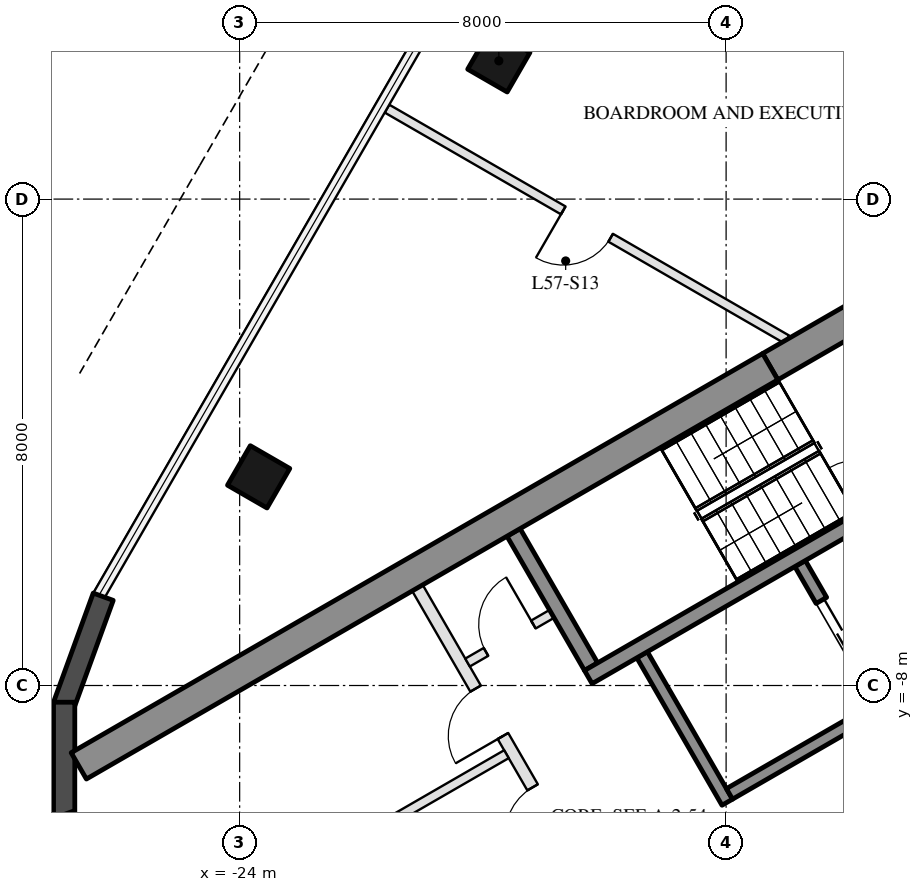
"""IFC4 building model, lengths in metres.
Left out: names, types, materials, properties, quantities, classifications, styles, units other than length and angle.
Written with IfcOpenShell. Run it as: python <this file> out.ifc"""

import sys

from ifc_helpers import new_model, si_unit, direction, frame, frame_2d, origin, origin_2d, place, context, subcontext, project, spatial, rectangle, hollow_rectangle, extrude, element, fill, save


model = new_model("IFC4")
c1 = context("Model", 3, precision=1e-05, world=origin(), true_north=direction((0.0, 1.0)))
c2 = subcontext(c1, "Body", "Model", "MODEL_VIEW")
j1 = project(units=[si_unit("LENGTHUNIT", "METRE"), si_unit("PLANEANGLEUNIT", "RADIAN")], contexts=[c1])
p1 = place(None, origin())
s1 = spatial("IfcSite", under=j1, at=p1, CompositionType="ELEMENT")
p2 = place(p1, origin())
s2 = spatial("IfcBuilding", under=s1, at=p2, CompositionType="ELEMENT")
p3 = place(p2, frame((0.0, 0.0, 231.7)))
s3 = spatial("IfcBuildingStorey", under=s2, at=p3, CompositionType="ELEMENT", Elevation=231.7)
for number, where, z_axis, x_axis in (
    (1, (-19.738, 2.273, 0.0), (0.0, 0.0, 1.0), (0.5, 0.866, 0.0)),
    (2, (-23.688, -4.568, 0.0), (0.0, 0.0, 1.0), (0.5, 0.866, 0.0)),
):
    element("IfcColumn", number, at=place(p3, frame(where, z_axis=z_axis, x_axis=x_axis)), inside=s3, PredefinedType="COLUMN", context=c2, shape_type="SweptSolid", body=[
        extrude(hollow_rectangle(XDim=0.75, YDim=0.75, WallThickness=0.035, at=origin_2d()), origin(), (0.0, 0.0, 1.0), 6.0),
    ])
for number, where, z_axis, x_axis in (
    (3, (-26.244, -6.54, 0.0), (0.0, 0.0, 1.0), (-0.342, -0.94, 0.0)),
    (4, (-26.886, -8.275, 0.0), (0.0, 0.0, 1.0), (0.0, -1.0, 0.0)),
    (5, (-26.897, -10.125, 0.0), (0.0, 0.0, 1.0), (0.342, -0.94, 0.0)),
):
    element("IfcWall", number, at=place(p3, frame(where, z_axis=z_axis, x_axis=x_axis)), inside=s3, PredefinedType="SOLIDWALL", context=c2, shape_type="SweptSolid", body=[
        extrude(rectangle(XDim=1.91, YDim=0.35, at=frame_2d((0.955, 0.0))), origin(), (0.0, 0.0, 1.0), 5.7),
    ])
p4 = place(p3, frame((-19.496, -5.482, 0.0), z_axis=(0.0, 0.0, 1.0), x_axis=(0.499990435942, -0.866030925526, 0.0)))
e6 = element("IfcWall", 6, at=p4, inside=s3, PredefinedType="SHEAR", context=c2, shape_type="SweptSolid", body=[
    extrude(rectangle(XDim=2.55, YDim=0.25, at=frame_2d((1.275, 0.0))), origin(), (0.0, 0.0, 1.0), 5.7),
])
p5 = place(p3, frame((-17.381, -7.495, 0.0), z_axis=(0.0, 0.0, 1.0), x_axis=(0.500011755427, -0.866018616679, 0.0)))
e7 = element("IfcWall", 7, at=p5, inside=s3, PredefinedType="SHEAR", context=c2, shape_type="SweptSolid", body=[
    extrude(rectangle(XDim=2.8, YDim=0.2, at=frame_2d((1.4, 0.0))), origin(), (0.0, 0.0, 1.0), 5.7),
])
p6 = place(p3, frame((-14.783, -5.995, 0.0), z_axis=(0.0, 0.0, 1.0), x_axis=(0.49994636267, -0.866056369097, 0.0)))
e8 = element("IfcWall", 8, at=p6, inside=s3, PredefinedType="SHEAR", context=c2, shape_type="SweptSolid", body=[
    extrude(rectangle(XDim=2.8, YDim=0.2, at=frame_2d((1.4, 0.0))), origin(), (0.0, 0.0, 1.0), 5.7),
])
p7 = place(p6, frame((0.7, 0.0, 0.0)))
e9 = element("IfcOpeningElement", 9, at=p7, cuts=e8, PredefinedType="OPENING", context=c2, shape_type="SweptSolid", body=[
    extrude(rectangle(XDim=1.2, YDim=2.1, at=frame_2d((0.6, 1.05))), frame((0.0, 0.11, 0.0), z_axis=(0.0, -1.0, 0.0), x_axis=(1.0, 0.0, 0.0)), (0.0, 0.0, 1.0), 0.22),
])
p8 = place(p3, frame((-13.52, -8.383, 0.0), z_axis=(0.0, 0.0, 1.0), x_axis=(-0.866034573852, -0.49998411664, 0.0)))
e10 = element("IfcWall", 10, at=p8, inside=s3, PredefinedType="SHEAR", context=c2, shape_type="SweptSolid", body=[
    extrude(rectangle(XDim=2.8, YDim=0.2, at=frame_2d((1.4, 0.0))), origin(), (0.0, 0.0, 1.0), 5.7),
])
p9 = place(p3, frame((-10.068, -9.162, 0.0), z_axis=(0.0, 0.0, 1.0), x_axis=(-0.866032725843, -0.499987317609, 0.0)))
e11 = element("IfcWall", 11, at=p9, inside=s3, PredefinedType="SHEAR", context=c2, shape_type="SweptSolid", body=[
    extrude(rectangle(XDim=10.16, YDim=0.2, at=frame_2d((5.08, 0.0))), origin(), (0.0, 0.0, 1.0), 5.7),
])
p10 = place(p9, frame((0.62, 0.0, 0.0)))
e12 = element("IfcOpeningElement", 12, at=p10, cuts=e11, PredefinedType="OPENING", context=c2, shape_type="SweptSolid", body=[
    extrude(rectangle(XDim=1.1, YDim=2.1, at=frame_2d((0.55, 1.05))), frame((0.0, 0.11, 0.0), z_axis=(0.0, -1.0, 0.0), x_axis=(1.0, 0.0, 0.0)), (0.0, 0.0, 1.0), 0.22),
])
p11 = place(p9, frame((3.16, 0.0, 0.0)))
e13 = element("IfcOpeningElement", 13, at=p11, cuts=e11, PredefinedType="OPENING", context=c2, shape_type="SweptSolid", body=[
    extrude(rectangle(XDim=1.1, YDim=2.1, at=frame_2d((0.55, 1.05))), frame((0.0, 0.11, 0.0), z_axis=(0.0, -1.0, 0.0), x_axis=(1.0, 0.0, 0.0)), (0.0, 0.0, 1.0), 0.22),
])
p12 = place(p9, frame((5.7, 0.0, 0.0)))
e14 = element("IfcOpeningElement", 14, at=p12, cuts=e11, PredefinedType="OPENING", context=c2, shape_type="SweptSolid", body=[
    extrude(rectangle(XDim=1.1, YDim=2.1, at=frame_2d((0.55, 1.05))), frame((0.0, 0.11, 0.0), z_axis=(0.0, -1.0, 0.0), x_axis=(1.0, 0.0, 0.0)), (0.0, 0.0, 1.0), 0.22),
])
p13 = place(p9, frame((8.24, 0.0, 0.0)))
e15 = element("IfcOpeningElement", 15, at=p13, cuts=e11, PredefinedType="OPENING", context=c2, shape_type="SweptSolid", body=[
    extrude(rectangle(XDim=1.1, YDim=2.1, at=frame_2d((0.55, 1.05))), frame((0.0, 0.11, 0.0), z_axis=(0.0, -1.0, 0.0), x_axis=(1.0, 0.0, 0.0)), (0.0, 0.0, 1.0), 0.22),
])
p14 = place(p3, frame((-21.076, -6.395, 0.0), z_axis=(0.0, 0.0, 1.0), x_axis=(0.50001468107, -0.866016927499, 0.0)))
e16 = element("IfcWall", 16, at=p14, inside=s3, PredefinedType="PARTITIONING", context=c2, shape_type="SweptSolid", body=[
    extrude(rectangle(XDim=5.4, YDim=0.2, at=frame_2d((2.7, 0.0))), origin(), (0.0, 0.0, 1.0), 5.7),
])
p15 = place(p14, frame((1.913, 0.0, 0.0)))
e17 = element("IfcOpeningElement", 17, at=p15, cuts=e16, PredefinedType="OPENING", context=c2, shape_type="SweptSolid", body=[
    extrude(rectangle(XDim=0.9, YDim=2.1, at=frame_2d((0.45, 1.05))), frame((0.0, 0.11, 0.0), z_axis=(0.0, -1.0, 0.0), x_axis=(1.0, 0.0, 0.0)), (0.0, 0.0, 1.0), 0.22),
])
p16 = place(p14, frame((3.788, 0.0, 0.0)))
e18 = element("IfcOpeningElement", 18, at=p16, cuts=e16, PredefinedType="OPENING", context=c2, shape_type="SweptSolid", body=[
    extrude(rectangle(XDim=0.9, YDim=2.1, at=frame_2d((0.45, 1.05))), frame((0.0, 0.11, 0.0), z_axis=(0.0, -1.0, 0.0), x_axis=(1.0, 0.0, 0.0)), (0.0, 0.0, 1.0), 0.22),
])
p17 = place(p3, frame((-18.866, -6.822, 0.0), z_axis=(0.0, 0.0, 1.0), x_axis=(-0.866028054938, -0.499995408039, 0.0)))
e19 = element("IfcWall", 19, at=p17, inside=s3, PredefinedType="PARTITIONING", context=c2, shape_type="SweptSolid", body=[
    extrude(rectangle(XDim=1.6, YDim=0.15, at=frame_2d((0.8, 0.0))), origin(), (0.0, 0.0, 1.0), 5.7),
])
p18 = place(p17, frame((0.35, 0.0, 0.0)))
e20 = element("IfcOpeningElement", 20, at=p18, cuts=e19, PredefinedType="OPENING", context=c2, shape_type="SweptSolid", body=[
    extrude(rectangle(XDim=0.9, YDim=2.1, at=frame_2d((0.45, 1.05))), frame((0.0, 0.085, 0.0), z_axis=(0.0, -1.0, 0.0), x_axis=(1.0, 0.0, 0.0)), (0.0, 0.0, 1.0), 0.17),
])
p19 = place(p3, frame((-19.613, -9.13, 0.0), z_axis=(0.0, 0.0, 1.0), x_axis=(-0.866031734426, -0.499989034847, 0.0)))
e21 = element("IfcWall", 21, at=p19, inside=s3, PredefinedType="PARTITIONING", context=c2, shape_type="SweptSolid", body=[
    extrude(rectangle(XDim=6.95, YDim=0.15, at=frame_2d((3.475, 0.0))), origin(), (0.0, 0.0, 1.0), 5.7),
])
p20 = place(p3, frame((-13.797, -1.903, 0.0), z_axis=(0.0, 0.0, 1.0), x_axis=(-0.866033076574, -0.499986710104, 0.0)))
e22 = element("IfcWall", 22, at=p20, inside=s3, PredefinedType="SHEAR", context=c2, shape_type="SweptSolid", body=[
    extrude(rectangle(XDim=1.706, YDim=0.5, at=frame_2d((0.853, 0.0))), origin(), (0.0, 0.0, 1.0), 5.7),
])
p21 = place(p3, frame((-15.274, -2.756, 0.0), z_axis=(0.0, 0.0, 1.0), x_axis=(-0.86602396135, -0.500002498361, 0.0)))
e23 = element("IfcWall", 23, at=p21, inside=s3, PredefinedType="SHEAR", context=c2, shape_type="SweptSolid", body=[
    extrude(rectangle(XDim=13.131, YDim=0.5, at=frame_2d((6.565, 0.0))), origin(), (0.0, 0.0, 1.0), 5.7),
])
p22 = place(p3, frame((-13.812, -5.29, 0.0), z_axis=(0.0, 0.0, 1.0), x_axis=(-0.866023561601, -0.500003190742, 0.0)))
e24 = element("IfcWall", 24, at=p22, inside=s3, PredefinedType="SHEAR", context=c2, shape_type="SweptSolid", body=[
    extrude(rectangle(XDim=5.144, YDim=0.25, at=frame_2d((2.572, 0.0))), origin(), (0.0, 0.0, 1.0), 5.7),
])
p23 = place(p3, frame((-18.577, 6.684, 0.0), z_axis=(0.0, 0.0, 1.0), x_axis=(0.866026447599, -0.499998192055, 0.0)))
e25 = element("IfcWall", 25, at=p23, inside=s3, PredefinedType="PARTITIONING", context=c2, shape_type="SweptSolid", body=[
    extrude(rectangle(XDim=10.73, YDim=0.15, at=frame_2d((5.365, 0.0))), origin(), (0.0, 0.0, 1.0), 5.7),
])
p24 = place(p3, frame((-21.577, 1.488, 0.0), z_axis=(0.0, 0.0, 1.0), x_axis=(0.866014808974, -0.500018350302, 0.0)))
e26 = element("IfcWall", 26, at=p24, inside=s3, PredefinedType="PARTITIONING", context=c2, shape_type="SweptSolid", body=[
    extrude(rectangle(XDim=7.594, YDim=0.15, at=frame_2d((3.797, 0.0))), origin(), (0.0, 0.0, 1.0), 5.7),
])
p25 = place(p24, frame((3.347, 0.0, 0.0)))
e27 = element("IfcOpeningElement", 27, at=p25, cuts=e26, PredefinedType="OPENING", context=c2, shape_type="SweptSolid", body=[
    extrude(rectangle(XDim=0.9, YDim=2.1, at=frame_2d((0.45, 1.05))), frame((0.0, 0.085, 0.0), z_axis=(0.0, -1.0, 0.0), x_axis=(1.0, 0.0, 0.0)), (0.0, 0.0, 1.0), 0.17),
])
p26 = place(p7, origin())
e28 = element("IfcDoor", 28, at=p26, inside=s3, OperationType="DOUBLE_DOOR_SLIDING", PredefinedType="DOOR", context=c2, shape_type="SweptSolid", body=[
    extrude(rectangle(XDim=1.2, YDim=2.1, at=frame_2d((0.6, 1.05))), frame((0.0, 0.025, 0.0), z_axis=(0.0, -1.0, 0.0), x_axis=(1.0, 0.0, 0.0)), (0.0, 0.0, 1.0), 0.05),
])
fill(e9, e28)
p27 = place(p18, frame((0.9, 0.0, 0.0), z_axis=(0.0, 0.0, 1.0), x_axis=(-1.0, 0.0, 0.0)))
e29 = element("IfcDoor", 29, at=p27, inside=s3, OperationType="SINGLE_SWING_RIGHT", PredefinedType="DOOR", context=c2, shape_type="SweptSolid", body=[
    extrude(rectangle(XDim=0.9, YDim=2.1, at=frame_2d((0.45, 1.05))), frame((0.0, 0.025, 0.0), z_axis=(0.0, -1.0, 0.0), x_axis=(1.0, 0.0, 0.0)), (0.0, 0.0, 1.0), 0.05),
])
fill(e20, e29)
p28 = place(p15, frame((0.9, 0.0, 0.0), z_axis=(0.0, 0.0, 1.0), x_axis=(-1.0, 0.0, 0.0)))
e30 = element("IfcDoor", 30, at=p28, inside=s3, OperationType="SINGLE_SWING_LEFT", PredefinedType="DOOR", context=c2, shape_type="SweptSolid", body=[
    extrude(rectangle(XDim=0.9, YDim=2.1, at=frame_2d((0.45, 1.05))), frame((0.0, 0.025, 0.0), z_axis=(0.0, -1.0, 0.0), x_axis=(1.0, 0.0, 0.0)), (0.0, 0.0, 1.0), 0.05),
])
fill(e17, e30)
p29 = place(p16, frame((0.9, 0.0, 0.0), z_axis=(0.0, 0.0, 1.0), x_axis=(-1.0, 0.0, 0.0)))
e31 = element("IfcDoor", 31, at=p29, inside=s3, OperationType="SINGLE_SWING_LEFT", PredefinedType="DOOR", context=c2, shape_type="SweptSolid", body=[
    extrude(rectangle(XDim=0.9, YDim=2.1, at=frame_2d((0.45, 1.05))), frame((0.0, 0.025, 0.0), z_axis=(0.0, -1.0, 0.0), x_axis=(1.0, 0.0, 0.0)), (0.0, 0.0, 1.0), 0.05),
])
fill(e18, e31)
p30 = place(p25, frame((0.9, 0.0, 0.0), z_axis=(0.0, 0.0, 1.0), x_axis=(-1.0, 0.0, 0.0)))
e32 = element("IfcDoor", 32, at=p30, inside=s3, OperationType="SINGLE_SWING_RIGHT", PredefinedType="DOOR", context=c2, shape_type="SweptSolid", body=[
    extrude(rectangle(XDim=0.9, YDim=2.1, at=frame_2d((0.45, 1.05))), frame((0.0, 0.025, 0.0), z_axis=(0.0, -1.0, 0.0), x_axis=(1.0, 0.0, 0.0)), (0.0, 0.0, 1.0), 0.05),
])
fill(e27, e32)
save(model, sys.argv[1])
